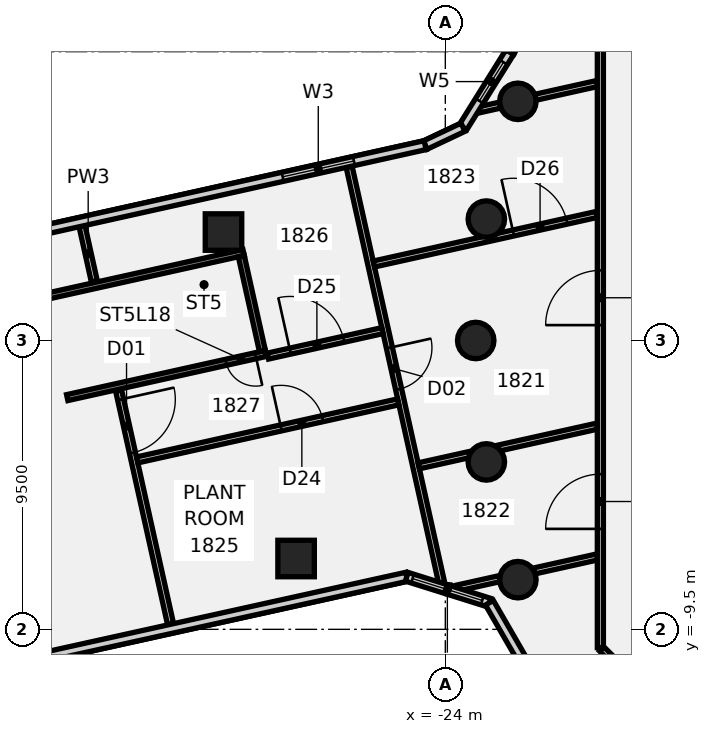
"""IFC4 building model, lengths in metres.
Left out: names, types, materials, properties, quantities, classifications, styles, units other than length and angle.
Written with IfcOpenShell. Run it as: python <this file> out.ifc"""

import sys

from ifc_helpers import new_model, si_unit, direction, frame, frame_2d, origin, origin_2d, place, context, subcontext, project, spatial, polyline, rectangle, circle, outline, extrude, element, fill, save


model = new_model("IFC4")
c1 = context("Model", 3, precision=1e-05, world=origin(), true_north=direction((0.0, 1.0)))
c2 = subcontext(c1, "Body", "Model", "MODEL_VIEW")
j1 = project(units=[si_unit("LENGTHUNIT", "METRE"), si_unit("PLANEANGLEUNIT", "RADIAN")], contexts=[c1])
p1 = place(None, origin())
s1 = spatial("IfcSite", under=j1, at=p1, CompositionType="ELEMENT")
p2 = place(p1, origin())
s2 = spatial("IfcBuilding", under=s1, at=p2, CompositionType="ELEMENT")
p3 = place(p2, frame((0.0, 0.0, 79.0)))
s3 = spatial("IfcBuildingStorey", under=s2, at=p3, CompositionType="ELEMENT", Elevation=79.0)
for number, where, z_axis, x_axis in (
    (1, (-21.613, 7.866, -0.18), (0.0, 0.0, 1.0), (1.0, 0.0, 0.0)),
    (2, (-22.651, 3.994, -0.18), (0.0, 0.0, 1.0), (1.0, 0.0, 0.0)),
    (3, (-23.0, 0.0, -0.18), (0.0, 0.0, 1.0), (1.0, 0.0, 0.0)),
    (4, (-22.651, -3.994, -0.18), (0.0, 0.0, 1.0), (1.0, 0.0, 0.0)),
    (5, (-21.613, -7.866, -0.18), (0.0, 0.0, 1.0), (1.0, 0.0, 0.0)),
):
    element("IfcColumn", number, at=place(p3, frame(where, z_axis=z_axis, x_axis=x_axis)), inside=s3, PredefinedType="COLUMN", context=c2, shape_type="SweptSolid", body=[
        extrude(circle(Radius=0.6, at=origin_2d()), origin(), (0.0, 0.0, 1.0), 4.54),
    ])
p4 = place(p3, frame((-37.693, -9.125, -0.173), z_axis=(0.037120340526, -0.06251280535, 0.997353613061), x_axis=(-0.215890896147, 0.973970607022, 0.069082397308)))
e6 = element("IfcColumn", 6, at=p4, inside=s3, PredefinedType="COLUMN", context=c2, shape_type="SweptSolid", body=[
    extrude(rectangle(XDim=1.2, YDim=1.2, at=origin_2d()), origin(), (0.0, 0.0, 1.0), 4.538),
])
p5 = place(p3, frame((-28.908, -7.171, -0.175), z_axis=(0.029020888191, -0.027459467491, 0.999201564097), x_axis=(-0.21648201457, 0.975725272019, 0.033101826414)))
e7 = element("IfcColumn", 7, at=p5, inside=s3, PredefinedType="COLUMN", context=c2, shape_type="SweptSolid", body=[
    extrude(rectangle(XDim=1.2, YDim=1.2, at=origin_2d()), origin(), (0.0, 0.0, 1.0), 4.534),
])
p6 = place(p3, frame((-31.296, 3.567, -0.175), z_axis=(-0.013944362332, -0.037418269579, 0.999202395844), x_axis=(0.975880776515, 0.21721764254, 0.021753293964)))
e8 = element("IfcColumn", 8, at=p6, inside=s3, PredefinedType="COLUMN", context=c2, shape_type="SweptSolid", body=[
    extrude(rectangle(XDim=1.2, YDim=1.2, at=origin_2d()), origin(), (0.0, 0.0, 1.0), 4.535),
])
p7 = place(p3, frame((-35.949, 3.761, 0.0), z_axis=(0.0, 0.0, 1.0), x_axis=(0.217083412402, -0.976153057702, 0.0)))
e9 = element("IfcWall", 9, at=p7, inside=s3, PredefinedType="PARTITIONING", context=c2, shape_type="SweptSolid", body=[
    extrude(rectangle(XDim=1.859, YDim=0.2, at=frame_2d((0.93, 0.0))), origin(), (0.0, 0.0, 1.0), 3.66),
])
p8 = place(p3, frame((-34.746, -1.647, 0.0), z_axis=(0.0, 0.0, 1.0), x_axis=(0.217124140151, -0.976143999502, 0.0)))
e10 = element("IfcWall", 10, at=p8, inside=s3, PredefinedType="PARTITIONING", context=c2, shape_type="SweptSolid", body=[
    extrude(rectangle(XDim=7.874, YDim=0.2, at=frame_2d((3.937, 0.0))), origin(), (0.0, 0.0, 1.0), 3.66),
])
p9 = place(p8, frame((0.3, 0.0, 0.0)))
e11 = element("IfcOpeningElement", 11, at=p9, cuts=e10, PredefinedType="OPENING", context=c2, shape_type="SweptSolid", body=[
    extrude(rectangle(XDim=1.8, YDim=2.1, at=frame_2d((0.9, 1.05))), frame((0.0, 0.11, 0.0), z_axis=(0.0, -1.0, 0.0), x_axis=(1.0, 0.0, 0.0)), (0.0, 0.0, 1.0), 0.22),
])
p10 = place(p3, frame((-27.164, 5.714, 0.0), z_axis=(0.0, 0.0, 1.0), x_axis=(0.217081624554, -0.976153455293, 0.0)))
e12 = element("IfcWall", 12, at=p10, inside=s3, PredefinedType="PARTITIONING", context=c2, shape_type="SweptSolid", body=[
    extrude(rectangle(XDim=14.022, YDim=0.2, at=frame_2d((7.011, 0.0))), origin(), (0.0, 0.0, 1.0), 3.66),
])
p11 = place(p10, frame((6.099, 0.0, 0.0)))
e13 = element("IfcOpeningElement", 13, at=p11, cuts=e12, PredefinedType="OPENING", context=c2, shape_type="SweptSolid", body=[
    extrude(rectangle(XDim=1.4, YDim=2.1, at=frame_2d((0.7, 1.05))), frame((0.0, 0.11, 0.0), z_axis=(0.0, -1.0, 0.0), x_axis=(1.0, 0.0, 0.0)), (0.0, 0.0, 1.0), 0.22),
])
p12 = place(p3, frame((-18.858, -10.142, 0.0), z_axis=(0.0, 0.0, 1.0), x_axis=(0.707106781187, -0.707106781187, 0.0)))
e14 = element("IfcWall", 14, at=p12, inside=s3, PredefinedType="PARTITIONING", context=c2, shape_type="SweptSolid", body=[
    extrude(rectangle(XDim=2.426, YDim=0.2, at=frame_2d((1.213, 0.0))), origin(), (0.0, 0.0, 1.0), 3.66),
])
p13 = place(p3, frame((-34.132, -3.927, 0.0), z_axis=(0.0, 0.0, 1.0), x_axis=(0.976144561186, 0.217121614921, 0.0)))
e15 = element("IfcWall", 15, at=p13, inside=s3, PredefinedType="PARTITIONING", context=c2, shape_type="SweptSolid", body=[
    extrude(rectangle(XDim=8.79, YDim=0.2, at=frame_2d((4.395, 0.0))), origin(), (0.0, 0.0, 1.0), 3.66),
])
p14 = place(p13, frame((4.845, 0.0, 0.0)))
e16 = element("IfcOpeningElement", 16, at=p14, cuts=e15, PredefinedType="OPENING", context=c2, shape_type="SweptSolid", body=[
    extrude(rectangle(XDim=1.4, YDim=2.1, at=frame_2d((0.7, 1.05))), frame((0.0, 0.11, 0.0), z_axis=(0.0, -1.0, 0.0), x_axis=(1.0, 0.0, 0.0)), (0.0, 0.0, 1.0), 0.22),
])
p15 = place(p3, frame((-29.835, -0.513, 0.0), z_axis=(0.0, 0.0, 1.0), x_axis=(0.976172172107, 0.216997443313, 0.0)))
e17 = element("IfcWall", 17, at=p15, inside=s3, PredefinedType="PARTITIONING", context=c2, shape_type="SweptSolid", body=[
    extrude(rectangle(XDim=3.859, YDim=0.2, at=frame_2d((1.93, 0.0))), origin(), (0.0, 0.0, 1.0), 3.66),
])
p16 = place(p15, frame((0.75, 0.0, 0.0)))
e18 = element("IfcOpeningElement", 18, at=p16, cuts=e17, PredefinedType="OPENING", context=c2, shape_type="SweptSolid", body=[
    extrude(rectangle(XDim=1.8, YDim=2.1, at=frame_2d((0.9, 1.05))), frame((0.0, 0.11, 0.0), z_axis=(0.0, -1.0, 0.0), x_axis=(1.0, 0.0, 0.0)), (0.0, 0.0, 1.0), 0.22),
])
p17 = place(p3, frame((-26.349, 2.516, 0.0), z_axis=(0.0, 0.0, 1.0), x_axis=(0.976161866319, 0.217043799141, 0.0)))
e19 = element("IfcWall", 19, at=p17, inside=s3, PredefinedType="PARTITIONING", context=c2, shape_type="SweptSolid", body=[
    extrude(rectangle(XDim=7.526, YDim=0.2, at=frame_2d((3.763, 0.0))), origin(), (0.0, 0.0, 1.0), 3.66),
])
p18 = place(p17, frame((4.7, 0.0, 0.0)))
e20 = element("IfcOpeningElement", 20, at=p18, cuts=e19, PredefinedType="OPENING", context=c2, shape_type="SweptSolid", body=[
    extrude(rectangle(XDim=1.8, YDim=2.1, at=frame_2d((0.9, 1.05))), frame((0.0, 0.11, 0.0), z_axis=(0.0, -1.0, 0.0), x_axis=(1.0, 0.0, 0.0)), (0.0, 0.0, 1.0), 0.22),
])
p19 = place(p3, frame((-24.873, -4.122, 0.0), z_axis=(0.0, 0.0, 1.0), x_axis=(0.976143603736, 0.217125919423, 0.0)))
e21 = element("IfcWall", 21, at=p19, inside=s3, PredefinedType="PARTITIONING", context=c2, shape_type="SweptSolid", body=[
    extrude(rectangle(XDim=1.719, YDim=0.2, at=frame_2d((0.86, 0.0))), origin(), (0.0, 0.0, 1.0), 3.66),
])
p20 = place(p3, frame((-22.268, -3.543, 0.0), z_axis=(0.0, 0.0, 1.0), x_axis=(0.9761664515, 0.217023176105, 0.0)))
e22 = element("IfcWall", 22, at=p20, inside=s3, PredefinedType="PARTITIONING", context=c2, shape_type="SweptSolid", body=[
    extrude(rectangle(XDim=3.346, YDim=0.2, at=frame_2d((1.673, 0.0))), origin(), (0.0, 0.0, 1.0), 3.66),
])
p21 = place(p3, frame((-23.592, -8.14, 0.0), z_axis=(0.0, 0.0, 1.0), x_axis=(0.976142259417, 0.217131963057, 0.0)))
e23 = element("IfcWall", 23, at=p21, inside=s3, PredefinedType="PARTITIONING", context=c2, shape_type="SweptSolid", body=[
    extrude(rectangle(XDim=1.411, YDim=0.2, at=frame_2d((0.706, 0.0))), origin(), (0.0, 0.0, 1.0), 3.66),
])
p22 = place(p3, frame((-21.08, -7.581, 0.0), z_axis=(0.0, 0.0, 1.0), x_axis=(0.97615465389, 0.217076234739, 0.0)))
e24 = element("IfcWall", 24, at=p22, inside=s3, PredefinedType="PARTITIONING", context=c2, shape_type="SweptSolid", body=[
    extrude(rectangle(XDim=2.128, YDim=0.2, at=frame_2d((1.064, 0.0))), origin(), (0.0, 0.0, 1.0), 3.66),
])
p23 = place(p3, frame((-22.882, 7.589, 0.0), z_axis=(0.0, 0.0, 1.0), x_axis=(0.976097832704, 0.21733159225, 0.0)))
e25 = element("IfcWall", 25, at=p23, inside=s3, PredefinedType="PARTITIONING", context=c2, shape_type="SweptSolid", body=[
    extrude(rectangle(XDim=0.709, YDim=0.2, at=frame_2d((0.354, 0.0))), origin(), (0.0, 0.0, 1.0), 3.66),
])
p24 = place(p3, frame((-21.039, 7.999, 0.0), z_axis=(0.0, 0.0, 1.0), x_axis=(0.976145732889, 0.217116347063, 0.0)))
e26 = element("IfcWall", 26, at=p24, inside=s3, PredefinedType="PARTITIONING", context=c2, shape_type="SweptSolid", body=[
    extrude(rectangle(XDim=2.086, YDim=0.2, at=frame_2d((1.043, 0.0))), origin(), (0.0, 0.0, 1.0), 3.66),
])
p25 = place(p3, frame((-18.9, -10.1, 0.0), z_axis=(0.0, 0.0, 1.0), x_axis=(0.0, 1.0, 0.0)))
e27 = element("IfcWall", 27, at=p25, inside=s3, PredefinedType="PARTITIONING", context=c2, shape_type="SweptSolid", body=[
    extrude(rectangle(XDim=20.2, YDim=0.2, at=frame_2d((10.1, 0.0))), origin(), (0.0, 0.0, 1.0), 3.66),
])
p26 = place(p25, frame((10.606, 0.0, 0.0)))
e28 = element("IfcOpeningElement", 28, at=p26, cuts=e27, PredefinedType="OPENING", context=c2, shape_type="SweptSolid", body=[
    extrude(rectangle(XDim=1.8, YDim=2.1, at=frame_2d((0.9, 1.05))), frame((0.0, 0.11, 0.0), z_axis=(0.0, -1.0, 0.0), x_axis=(1.0, 0.0, 0.0)), (0.0, 0.0, 1.0), 0.22),
])
p27 = place(p25, frame((3.904, 0.0, 0.0)))
e29 = element("IfcOpeningElement", 29, at=p27, cuts=e27, PredefinedType="OPENING", context=c2, shape_type="SweptSolid", body=[
    extrude(rectangle(XDim=1.8, YDim=2.1, at=frame_2d((0.9, 1.05))), frame((0.0, 0.11, 0.0), z_axis=(0.0, -1.0, 0.0), x_axis=(1.0, 0.0, 0.0)), (0.0, 0.0, 1.0), 0.22),
])
p28 = place(p3, frame((-45.013, -12.135, 0.0), z_axis=(0.0, 0.0, 1.0), x_axis=(0.976433864348, 0.215816840295, 0.0)))
e30 = element("IfcWall", 30, at=p28, inside=s3, PredefinedType="SOLIDWALL", context=c2, shape_type="SweptSolid", body=[
    extrude(rectangle(XDim=20.221, YDim=0.3, at=frame_2d((10.11, 0.0))), origin(), (0.0, 0.0, 1.0), 4.36),
])
p29 = place(p28, frame((5.7, 0.0, 1.4)))
e31 = element("IfcOpeningElement", 31, at=p29, cuts=e30, PredefinedType="OPENING", context=c2, shape_type="SweptSolid", body=[
    extrude(rectangle(XDim=2.4, YDim=2.1, at=frame_2d((1.2, 1.05))), frame((0.0, 0.16, 0.0), z_axis=(0.0, -1.0, 0.0), x_axis=(1.0, 0.0, 0.0)), (0.0, 0.0, 1.0), 0.32),
])
p30 = place(p3, frame((-25.268, -7.771, 0.0), z_axis=(0.0, 0.0, 1.0), x_axis=(0.954072095572, -0.299577096006, 0.0)))
e32 = element("IfcWall", 32, at=p30, inside=s3, PredefinedType="SOLIDWALL", context=c2, shape_type="SweptSolid", body=[
    extrude(rectangle(XDim=2.85, YDim=0.3, at=frame_2d((1.425, 0.0))), origin(), (0.0, 0.0, 1.0), 4.36),
])
p31 = place(p30, frame((0.2, 0.0, 1.4)))
e33 = element("IfcOpeningElement", 33, at=p31, cuts=e32, PredefinedType="OPENING", context=c2, shape_type="SweptSolid", body=[
    extrude(rectangle(XDim=2.4, YDim=2.1, at=frame_2d((1.2, 1.05))), frame((0.0, 0.16, 0.0), z_axis=(0.0, -1.0, 0.0), x_axis=(1.0, 0.0, 0.0)), (0.0, 0.0, 1.0), 0.32),
])
p32 = place(p3, frame((-22.549, -8.625, 0.0), z_axis=(0.0, 0.0, 1.0), x_axis=(0.500322641095, -0.86583904671, 0.0)))
e34 = element("IfcWall", 34, at=p32, inside=s3, PredefinedType="SOLIDWALL", context=c2, shape_type="SweptSolid", body=[
    extrude(rectangle(XDim=3.251, YDim=0.3, at=frame_2d((1.625, 0.0))), origin(), (0.0, 0.0, 1.0), 4.36),
])
p33 = place(p3, frame((-20.019, 12.956, 0.0), z_axis=(0.0, 0.0, 1.0), x_axis=(-0.472144036007, -0.881521417359, 0.0)))
e35 = element("IfcWall", 35, at=p33, inside=s3, PredefinedType="SOLIDWALL", context=c2, shape_type="SweptSolid", body=[
    extrude(rectangle(XDim=3.94, YDim=0.3, at=frame_2d((1.97, 0.0))), origin(), (0.0, 0.0, 1.0), 4.36),
])
p34 = place(p3, frame((-21.879, 9.483, 0.0), z_axis=(0.0, 0.0, 1.0), x_axis=(-0.528957701174, -0.848648189987, 0.0)))
e36 = element("IfcWall", 36, at=p34, inside=s3, PredefinedType="SOLIDWALL", context=c2, shape_type="SweptSolid", body=[
    extrude(rectangle(XDim=2.91, YDim=0.3, at=frame_2d((1.455, 0.0))), origin(), (0.0, 0.0, 1.0), 4.36),
])
p35 = place(p34, frame((0.39, 0.0, 1.4)))
e37 = element("IfcOpeningElement", 37, at=p35, cuts=e36, PredefinedType="OPENING", context=c2, shape_type="SweptSolid", body=[
    extrude(rectangle(XDim=1.5, YDim=1.0, at=frame_2d((0.75, 0.5))), frame((0.0, 0.16, 0.0), z_axis=(0.0, -1.0, 0.0), x_axis=(1.0, 0.0, 0.0)), (0.0, 0.0, 1.0), 0.32),
])
p36 = place(p3, frame((-23.418, 7.014, 0.0), z_axis=(0.0, 0.0, 1.0), x_axis=(-0.904159344398, -0.427195365071, 0.0)))
e38 = element("IfcWall", 38, at=p36, inside=s3, PredefinedType="SOLIDWALL", context=c2, shape_type="SweptSolid", body=[
    extrude(rectangle(XDim=1.378, YDim=0.3, at=frame_2d((0.689, 0.0))), origin(), (0.0, 0.0, 1.0), 4.36),
])
p37 = place(p3, frame((-24.665, 6.425, 0.0), z_axis=(0.0, 0.0, 1.0), x_axis=(-0.976153387473, -0.217081929523, 0.0)))
e39 = element("IfcWall", 39, at=p37, inside=s3, PredefinedType="SOLIDWALL", context=c2, shape_type="SweptSolid", body=[
    extrude(rectangle(XDim=23.892, YDim=0.3, at=frame_2d((11.946, 0.0))), origin(), (0.0, 0.0, 1.0), 4.36),
])
p38 = place(p37, frame((2.4, 0.0, 1.4)))
e40 = element("IfcOpeningElement", 40, at=p38, cuts=e39, PredefinedType="OPENING", context=c2, shape_type="SweptSolid", body=[
    extrude(rectangle(XDim=2.4, YDim=2.1, at=frame_2d((1.2, 1.05))), frame((0.0, 0.16, 0.0), z_axis=(0.0, -1.0, 0.0), x_axis=(1.0, 0.0, 0.0)), (0.0, 0.0, 1.0), 0.32),
])
p39 = place(p3, frame((-29.896, -0.424, -0.18), z_axis=(0.0, 0.0, 1.0), x_axis=(-0.97615532549, -0.217073214646, 0.0)))
e41 = element("IfcWall", 41, at=p39, inside=s3, PredefinedType="SHEAR", context=c2, shape_type="SweptSolid", body=[
    extrude(rectangle(XDim=6.7, YDim=0.2, at=frame_2d((3.35, 0.0))), origin(), (0.0, 0.0, 1.0), 3.94),
])
p40 = place(p39, frame((0.35, 0.0, 0.0)))
e42 = element("IfcOpeningElement", 42, at=p40, cuts=e41, PredefinedType="OPENING", context=c2, shape_type="SweptSolid", body=[
    extrude(rectangle(XDim=1.0, YDim=2.1, at=frame_2d((0.5, 1.05))), frame((0.0, 0.11, 0.0), z_axis=(0.0, -1.0, 0.0), x_axis=(1.0, 0.0, 0.0)), (0.0, 0.0, 1.0), 0.22),
])
p41 = place(p3, frame((-30.634, 2.895, -0.18), z_axis=(0.0, 0.0, 1.0), x_axis=(-0.976149320922, -0.217100214792, 0.0)))
e43 = element("IfcWall", 43, at=p41, inside=s3, PredefinedType="SHEAR", context=c2, shape_type="SweptSolid", body=[
    extrude(rectangle(XDim=6.7, YDim=0.2, at=frame_2d((3.35, 0.0))), origin(), (0.0, 0.0, 1.0), 3.94),
])
p42 = place(p3, frame((-30.71, 2.775, -0.18), z_axis=(0.0, 0.0, 1.0), x_axis=(0.217124322557, -0.976143958929, 0.0)))
e44 = element("IfcWall", 44, at=p42, inside=s3, PredefinedType="SHEAR", context=c2, shape_type="SweptSolid", body=[
    extrude(rectangle(XDim=3.2, YDim=0.2, at=frame_2d((1.6, 0.0))), origin(), (0.0, 0.0, 1.0), 3.94),
])
p43 = place(p3, frame((0.0, 0.0, -0.18)))
e45 = element("IfcWall", 45, at=p43, inside=s3, PredefinedType="SHEAR", context=c2, shape_type="SweptSolid", body=[
    extrude(outline(polyline([(-36.958, 1.386), (-37.153, 1.343), (-36.458, -1.781), (-36.263, -1.738), (-36.958, 1.386)])), origin(), (0.0, 0.0, 1.0), 3.94),
])
p44 = place(p9, frame((1.8, 0.0, 0.0), z_axis=(0.0, 0.0, 1.0), x_axis=(-1.0, 0.0, 0.0)))
e46 = element("IfcDoor", 46, at=p44, inside=s3, OperationType="DOUBLE_DOOR_SINGLE_SWING", PredefinedType="DOOR", context=c2, shape_type="SweptSolid", body=[
    extrude(rectangle(XDim=1.8, YDim=2.1, at=frame_2d((0.9, 1.05))), frame((0.0, 0.025, 0.0), z_axis=(0.0, -1.0, 0.0), x_axis=(1.0, 0.0, 0.0)), (0.0, 0.0, 1.0), 0.05),
])
fill(e11, e46)
p45 = place(p11, origin())
e47 = element("IfcDoor", 47, at=p45, inside=s3, OperationType="DOUBLE_DOOR_SINGLE_SWING", PredefinedType="DOOR", context=c2, shape_type="SweptSolid", body=[
    extrude(rectangle(XDim=1.4, YDim=2.1, at=frame_2d((0.7, 1.05))), frame((0.0, 0.025, 0.0), z_axis=(0.0, -1.0, 0.0), x_axis=(1.0, 0.0, 0.0)), (0.0, 0.0, 1.0), 0.05),
])
fill(e13, e47)
p46 = place(p14, frame((1.4, 0.0, 0.0), z_axis=(0.0, 0.0, 1.0), x_axis=(-1.0, 0.0, 0.0)))
e48 = element("IfcDoor", 48, at=p46, inside=s3, OperationType="DOUBLE_DOOR_SINGLE_SWING", PredefinedType="DOOR", context=c2, shape_type="SweptSolid", body=[
    extrude(rectangle(XDim=1.4, YDim=2.1, at=frame_2d((0.7, 1.05))), frame((0.0, 0.025, 0.0), z_axis=(0.0, -1.0, 0.0), x_axis=(1.0, 0.0, 0.0)), (0.0, 0.0, 1.0), 0.05),
])
fill(e16, e48)
p47 = place(p16, origin())
e49 = element("IfcDoor", 49, at=p47, inside=s3, OperationType="DOUBLE_DOOR_SINGLE_SWING", PredefinedType="DOOR", context=c2, shape_type="SweptSolid", body=[
    extrude(rectangle(XDim=1.8, YDim=2.1, at=frame_2d((0.9, 1.05))), frame((0.0, 0.025, 0.0), z_axis=(0.0, -1.0, 0.0), x_axis=(1.0, 0.0, 0.0)), (0.0, 0.0, 1.0), 0.05),
])
fill(e18, e49)
p48 = place(p18, origin())
e50 = element("IfcDoor", 50, at=p48, inside=s3, OperationType="DOUBLE_DOOR_SINGLE_SWING", PredefinedType="DOOR", context=c2, shape_type="SweptSolid", body=[
    extrude(rectangle(XDim=1.8, YDim=2.1, at=frame_2d((0.9, 1.05))), frame((0.0, 0.025, 0.0), z_axis=(0.0, -1.0, 0.0), x_axis=(1.0, 0.0, 0.0)), (0.0, 0.0, 1.0), 0.05),
])
fill(e20, e50)
p49 = place(p26, frame((1.8, 0.0, 0.0), z_axis=(0.0, 0.0, 1.0), x_axis=(-1.0, 0.0, 0.0)))
e51 = element("IfcDoor", 51, at=p49, inside=s3, OperationType="DOUBLE_DOOR_SINGLE_SWING", PredefinedType="DOOR", context=c2, shape_type="SweptSolid", body=[
    extrude(rectangle(XDim=1.8, YDim=2.1, at=frame_2d((0.9, 1.05))), frame((0.0, 0.025, 0.0), z_axis=(0.0, -1.0, 0.0), x_axis=(1.0, 0.0, 0.0)), (0.0, 0.0, 1.0), 0.05),
])
fill(e28, e51)
p50 = place(p27, origin())
e52 = element("IfcDoor", 52, at=p50, inside=s3, OperationType="DOUBLE_DOOR_SINGLE_SWING", PredefinedType="DOOR", context=c2, shape_type="SweptSolid", body=[
    extrude(rectangle(XDim=1.8, YDim=2.1, at=frame_2d((0.9, 1.05))), frame((0.0, 0.025, 0.0), z_axis=(0.0, -1.0, 0.0), x_axis=(1.0, 0.0, 0.0)), (0.0, 0.0, 1.0), 0.05),
])
fill(e29, e52)
p51 = place(p31, origin())
e53 = element("IfcWindow", 53, at=p51, inside=s3, PartitioningType="SINGLE_PANEL", PredefinedType="WINDOW", context=c2, shape_type="SweptSolid", body=[
    extrude(rectangle(XDim=2.4, YDim=2.1, at=frame_2d((1.2, 1.05))), frame((0.0, 0.03, 0.0), z_axis=(0.0, -1.0, 0.0), x_axis=(1.0, 0.0, 0.0)), (0.0, 0.0, 1.0), 0.06),
])
fill(e33, e53)
p52 = place(p35, origin())
e54 = element("IfcWindow", 54, at=p52, inside=s3, PartitioningType="SINGLE_PANEL", PredefinedType="WINDOW", context=c2, shape_type="SweptSolid", body=[
    extrude(rectangle(XDim=1.5, YDim=1.0, at=frame_2d((0.75, 0.5))), frame((0.0, 0.03, 0.0), z_axis=(0.0, -1.0, 0.0), x_axis=(1.0, 0.0, 0.0)), (0.0, 0.0, 1.0), 0.06),
])
fill(e37, e54)
p53 = place(p38, origin())
e55 = element("IfcWindow", 55, at=p53, inside=s3, PartitioningType="SINGLE_PANEL", PredefinedType="WINDOW", context=c2, shape_type="SweptSolid", body=[
    extrude(rectangle(XDim=2.4, YDim=2.1, at=frame_2d((1.2, 1.05))), frame((0.0, 0.03, 0.0), z_axis=(0.0, -1.0, 0.0), x_axis=(1.0, 0.0, 0.0)), (0.0, 0.0, 1.0), 0.06),
])
fill(e40, e55)
p54 = place(p40, origin())
e56 = element("IfcDoor", 56, at=p54, inside=s3, OperationType="SINGLE_SWING_LEFT", PredefinedType="DOOR", context=c2, shape_type="SweptSolid", body=[
    extrude(rectangle(XDim=1.0, YDim=2.1, at=frame_2d((0.5, 1.05))), frame((0.0, 0.025, 0.0), z_axis=(0.0, -1.0, 0.0), x_axis=(1.0, 0.0, 0.0)), (0.0, 0.0, 1.0), 0.05),
])
fill(e42, e56)
save(model, sys.argv[1])
